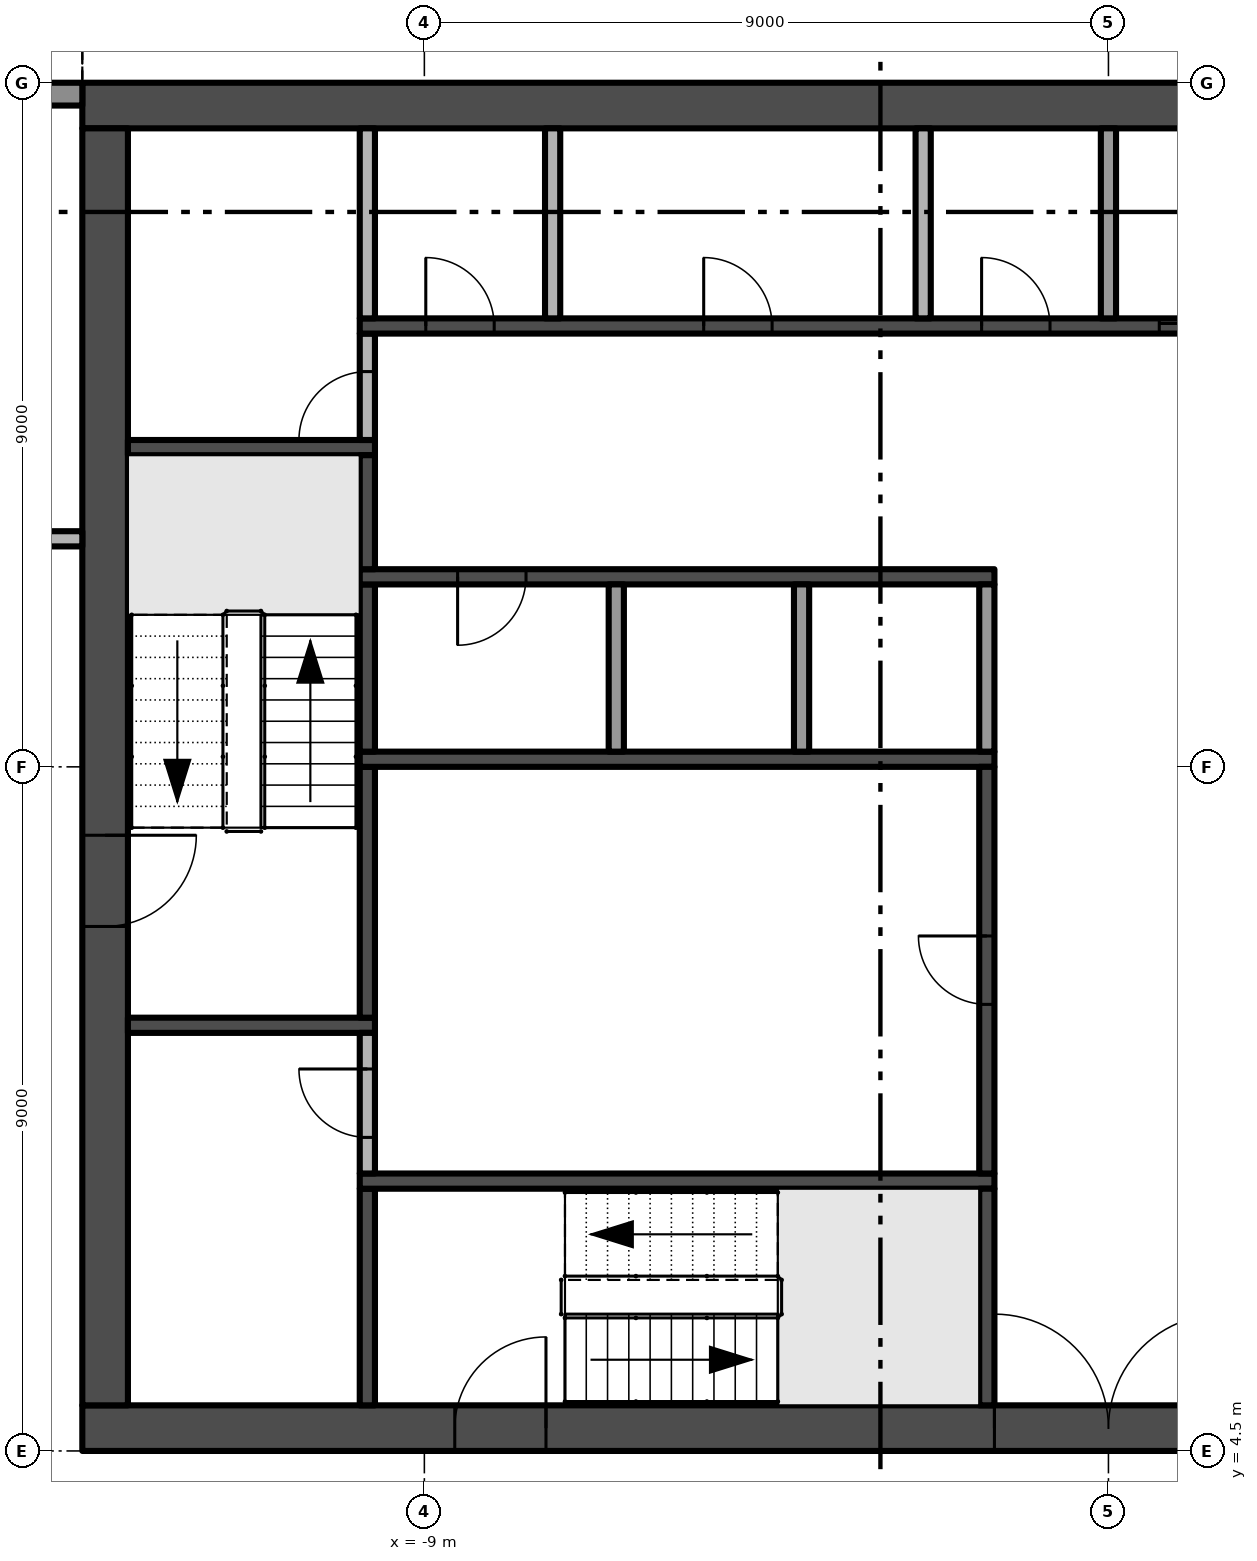
"""IFC4 building model, lengths in metres.
Left out: names, types, materials, properties, quantities, classifications, styles, units other than length and angle.
Written with IfcOpenShell. Run it as: python <this file> out.ifc"""

import sys

from ifc_helpers import new_model, si_unit, direction, frame, frame_2d, origin, place, context, subcontext, project, spatial, rectangle, extrude, element, fill, save


model = new_model("IFC4")
c1 = context("Model", 3, precision=1e-05, world=origin(), true_north=direction((0.0, 1.0)))
c2 = subcontext(c1, "Body", "Model", "MODEL_VIEW")
j1 = project(units=[si_unit("LENGTHUNIT", "METRE"), si_unit("PLANEANGLEUNIT", "RADIAN")], contexts=[c1])
p1 = place(None, origin())
s1 = spatial("IfcSite", under=j1, at=p1, CompositionType="ELEMENT")
p2 = place(p1, origin())
s2 = spatial("IfcBuilding", under=s1, at=p2, CompositionType="ELEMENT")
p3 = place(p2, frame((0.0, 0.0, 273.0)))
s3 = spatial("IfcBuildingStorey", under=s2, at=p3, CompositionType="ELEMENT", Elevation=273.0)
p4 = place(p3, frame((-13.5, 4.8, -0.3), z_axis=(0.0, 0.0, 1.0), x_axis=(1.0, 0.0, 0.0)))
e1 = element("IfcWall", 1, at=p4, inside=s3, PredefinedType="SHEAR", context=c2, shape_type="SweptSolid", body=[
    extrude(rectangle(XDim=27.0, YDim=0.6, at=frame_2d((13.5, 0.0))), origin(), (0.0, 0.0, 1.0), 3.8),
])
p5 = place(p4, frame((12.0, 0.0, 0.3)))
e2 = element("IfcOpeningElement", 2, at=p5, cuts=e1, PredefinedType="OPENING", context=c2, shape_type="SweptSolid", body=[
    extrude(rectangle(XDim=3.0, YDim=2.4, at=frame_2d((1.5, 1.2))), frame((0.0, 0.31, 0.0), z_axis=(0.0, -1.0, 0.0), x_axis=(1.0, 0.0, 0.0)), (0.0, 0.0, 1.0), 0.62),
])
p6 = place(p4, frame((4.9, 0.0, 0.3)))
e3 = element("IfcOpeningElement", 3, at=p6, cuts=e1, PredefinedType="OPENING", context=c2, shape_type="SweptSolid", body=[
    extrude(rectangle(XDim=1.2, YDim=2.2, at=frame_2d((0.6, 1.1))), frame((0.0, 0.31, 0.0), z_axis=(0.0, -1.0, 0.0), x_axis=(1.0, 0.0, 0.0)), (0.0, 0.0, 1.0), 0.62),
])
p7 = place(p4, frame((20.75, 0.0, 0.3)))
e4 = element("IfcOpeningElement", 4, at=p7, cuts=e1, PredefinedType="OPENING", context=c2, shape_type="SweptSolid", body=[
    extrude(rectangle(XDim=1.5, YDim=2.2, at=frame_2d((0.75, 1.1))), frame((0.0, 0.31, 0.0), z_axis=(0.0, -1.0, 0.0), x_axis=(1.0, 0.0, 0.0)), (0.0, 0.0, 1.0), 0.62),
])
p8 = place(p4, frame((17.4, 0.0, 0.3)))
e5 = element("IfcOpeningElement", 5, at=p8, cuts=e1, PredefinedType="OPENING", context=c2, shape_type="SweptSolid", body=[
    extrude(rectangle(XDim=1.2, YDim=2.2, at=frame_2d((0.6, 1.1))), frame((0.0, 0.31, 0.0), z_axis=(0.0, -1.0, 0.0), x_axis=(1.0, 0.0, 0.0)), (0.0, 0.0, 1.0), 0.62),
])
p9 = place(p3, frame((13.5, 22.2, -0.3), z_axis=(0.0, 0.0, 1.0), x_axis=(-1.0, 0.0, 0.0)))
e6 = element("IfcWall", 6, at=p9, inside=s3, PredefinedType="SHEAR", context=c2, shape_type="SweptSolid", body=[
    extrude(rectangle(XDim=27.0, YDim=0.6, at=frame_2d((13.5, 0.0))), origin(), (0.0, 0.0, 1.0), 3.8),
])
p10 = place(p3, frame((-13.2, 21.9, -0.3), z_axis=(0.0, 0.0, 1.0), x_axis=(0.0, -1.0, 0.0)))
e7 = element("IfcWall", 7, at=p10, inside=s3, PredefinedType="SHEAR", context=c2, shape_type="SweptSolid", body=[
    extrude(rectangle(XDim=16.8, YDim=0.6, at=frame_2d((8.4, 0.0))), origin(), (0.0, 0.0, 1.0), 3.8),
])
p11 = place(p10, frame((9.3, 0.0, 0.3)))
e8 = element("IfcOpeningElement", 8, at=p11, cuts=e7, PredefinedType="OPENING", context=c2, shape_type="SweptSolid", body=[
    extrude(rectangle(XDim=1.2, YDim=2.2, at=frame_2d((0.6, 1.1))), frame((0.0, 0.31, 0.0), z_axis=(0.0, -1.0, 0.0), x_axis=(1.0, 0.0, 0.0)), (0.0, 0.0, 1.0), 0.62),
])
p12 = place(p3, frame((-17.55, 22.35, 0.0), z_axis=(0.0, 0.0, 1.0), x_axis=(1.0, 0.0, 0.0)))
e9 = element("IfcWall", 9, at=p12, inside=s3, PredefinedType="SOLIDWALL", context=c2, shape_type="SweptSolid", body=[
    extrude(rectangle(XDim=4.05, YDim=0.3, at=frame_2d((2.025, 0.0))), origin(), (0.0, 0.0, 1.0), 3.5),
])
p13 = place(p12, frame((0.3, 0.0, 0.0)))
e10 = element("IfcOpeningElement", 10, at=p13, cuts=e9, PredefinedType="OPENING", context=c2, shape_type="SweptSolid", body=[
    extrude(rectangle(XDim=3.2, YDim=2.4, at=frame_2d((1.6, 1.2))), frame((0.0, 0.16, 0.0), z_axis=(0.0, -1.0, 0.0), x_axis=(1.0, 0.0, 0.0)), (0.0, 0.0, 1.0), 0.32),
])
for number, where, z_axis, x_axis in (
    (11, (-12.9, 10.1, 0.0), (0.0, 0.0, 1.0), (1.0, 0.0, 0.0)),
    (12, (-12.9, 17.7, 0.0), (0.0, 0.0, 1.0), (1.0, 0.0, 0.0)),
):
    element("IfcWall", number, at=place(p3, frame(where, z_axis=z_axis, x_axis=x_axis)), inside=s3, PredefinedType="SHEAR", context=c2, shape_type="SweptSolid", body=[
        extrude(rectangle(XDim=3.25, YDim=0.2, at=frame_2d((1.625, 0.0))), origin(), (0.0, 0.0, 1.0), 3.5),
    ])
p14 = place(p3, frame((-9.75, 5.1, 0.0), z_axis=(0.0, 0.0, 1.0), x_axis=(0.0, 1.0, 0.0)))
e13 = element("IfcWall", 13, at=p14, inside=s3, PredefinedType="SHEAR", context=c2, shape_type="SweptSolid", body=[
    extrude(rectangle(XDim=2.85, YDim=0.2, at=frame_2d((1.425, 0.0))), origin(), (0.0, 0.0, 1.0), 3.5),
])
p15 = place(p3, frame((-9.85, 8.05, 0.0), z_axis=(0.0, 0.0, 1.0), x_axis=(1.0, 0.0, 0.0)))
e14 = element("IfcWall", 14, at=p15, inside=s3, PredefinedType="SHEAR", context=c2, shape_type="SweptSolid", body=[
    extrude(rectangle(XDim=8.35, YDim=0.2, at=frame_2d((4.175, 0.0))), origin(), (0.0, 0.0, 1.0), 3.5),
])
p16 = place(p3, frame((-9.75, 8.15, 0.0), z_axis=(0.0, 0.0, 1.0), x_axis=(0.0, 1.0, 0.0)))
e15 = element("IfcWall", 15, at=p16, inside=s3, PredefinedType="PARTITIONING", context=c2, shape_type="SweptSolid", body=[
    extrude(rectangle(XDim=1.85, YDim=0.2, at=frame_2d((0.925, 0.0))), origin(), (0.0, 0.0, 1.0), 3.5),
])
p17 = place(p16, frame((0.475, 0.0, 0.0)))
e16 = element("IfcOpeningElement", 16, at=p17, cuts=e15, PredefinedType="OPENING", context=c2, shape_type="SweptSolid", body=[
    extrude(rectangle(XDim=0.9, YDim=2.1, at=frame_2d((0.45, 1.05))), frame((0.0, 0.11, 0.0), z_axis=(0.0, -1.0, 0.0), x_axis=(1.0, 0.0, 0.0)), (0.0, 0.0, 1.0), 0.22),
])
p18 = place(p3, frame((-9.75, 10.2, 0.0), z_axis=(0.0, 0.0, 1.0), x_axis=(0.0, 1.0, 0.0)))
e17 = element("IfcWall", 17, at=p18, inside=s3, PredefinedType="SHEAR", context=c2, shape_type="SweptSolid", body=[
    extrude(rectangle(XDim=3.3, YDim=0.2, at=frame_2d((1.65, 0.0))), origin(), (0.0, 0.0, 1.0), 3.5),
])
p19 = place(p3, frame((-9.85, 13.6, 0.0), z_axis=(0.0, 0.0, 1.0), x_axis=(1.0, 0.0, 0.0)))
e18 = element("IfcWall", 18, at=p19, inside=s3, PredefinedType="SHEAR", context=c2, shape_type="SweptSolid", body=[
    extrude(rectangle(XDim=8.35, YDim=0.2, at=frame_2d((4.175, 0.0))), origin(), (0.0, 0.0, 1.0), 3.5),
])
p20 = place(p3, frame((-9.75, 13.7, 0.0), z_axis=(0.0, 0.0, 1.0), x_axis=(0.0, 1.0, 0.0)))
e19 = element("IfcWall", 19, at=p20, inside=s3, PredefinedType="SHEAR", context=c2, shape_type="SweptSolid", body=[
    extrude(rectangle(XDim=2.2, YDim=0.2, at=frame_2d((1.1, 0.0))), origin(), (0.0, 0.0, 1.0), 3.5),
])
p21 = place(p3, frame((-1.5, 16.0, 0.0), z_axis=(0.0, 0.0, 1.0), x_axis=(-1.0, 0.0, 0.0)))
e20 = element("IfcWall", 20, at=p21, inside=s3, PredefinedType="SHEAR", context=c2, shape_type="SweptSolid", body=[
    extrude(rectangle(XDim=8.35, YDim=0.2, at=frame_2d((4.175, 0.0))), origin(), (0.0, 0.0, 1.0), 3.5),
])
p22 = place(p21, frame((6.162, 0.0, 0.0)))
e21 = element("IfcOpeningElement", 21, at=p22, cuts=e20, PredefinedType="OPENING", context=c2, shape_type="SweptSolid", body=[
    extrude(rectangle(XDim=0.9, YDim=2.1, at=frame_2d((0.45, 1.05))), frame((0.0, 0.11, 0.0), z_axis=(0.0, -1.0, 0.0), x_axis=(1.0, 0.0, 0.0)), (0.0, 0.0, 1.0), 0.22),
])
p23 = place(p3, frame((-9.75, 16.1, 0.0), z_axis=(0.0, 0.0, 1.0), x_axis=(0.0, 1.0, 0.0)))
e22 = element("IfcWall", 22, at=p23, inside=s3, PredefinedType="SHEAR", context=c2, shape_type="SweptSolid", body=[
    extrude(rectangle(XDim=1.5, YDim=0.2, at=frame_2d((0.75, 0.0))), origin(), (0.0, 0.0, 1.0), 3.5),
])
p24 = place(p3, frame((-9.75, 17.8, 0.0), z_axis=(0.0, 0.0, 1.0), x_axis=(0.0, 1.0, 0.0)))
e23 = element("IfcWall", 23, at=p24, inside=s3, PredefinedType="PARTITIONING", context=c2, shape_type="SweptSolid", body=[
    extrude(rectangle(XDim=1.4, YDim=0.2, at=frame_2d((0.7, 0.0))), origin(), (0.0, 0.0, 1.0), 3.5),
])
p25 = place(p24, origin())
e24 = element("IfcOpeningElement", 24, at=p25, cuts=e23, PredefinedType="OPENING", context=c2, shape_type="SweptSolid", body=[
    extrude(rectangle(XDim=0.9, YDim=2.1, at=frame_2d((0.45, 1.05))), frame((0.0, 0.11, 0.0), z_axis=(0.0, -1.0, 0.0), x_axis=(1.0, 0.0, 0.0)), (0.0, 0.0, 1.0), 0.22),
])
p26 = place(p3, frame((-9.85, 19.3, 0.0), z_axis=(0.0, 0.0, 1.0), x_axis=(1.0, 0.0, 0.0)))
e25 = element("IfcWall", 25, at=p26, inside=s3, PredefinedType="SHEAR", context=c2, shape_type="SweptSolid", body=[
    extrude(rectangle(XDim=19.7, YDim=0.2, at=frame_2d((9.85, 0.0))), origin(), (0.0, 0.0, 1.0), 3.5),
])
p27 = place(p26, frame((10.519, 0.0, 0.0)))
e26 = element("IfcOpeningElement", 26, at=p27, cuts=e25, PredefinedType="OPENING", context=c2, shape_type="SweptSolid", body=[
    extrude(rectangle(XDim=1.1, YDim=2.1, at=frame_2d((0.55, 1.05))), frame((0.0, 0.11, 0.0), z_axis=(0.0, -1.0, 0.0), x_axis=(1.0, 0.0, 0.0)), (0.0, 0.0, 1.0), 0.22),
])
p28 = place(p26, frame((12.956, 0.0, 0.0)))
e27 = element("IfcOpeningElement", 27, at=p28, cuts=e25, PredefinedType="OPENING", context=c2, shape_type="SweptSolid", body=[
    extrude(rectangle(XDim=1.1, YDim=2.1, at=frame_2d((0.55, 1.05))), frame((0.0, 0.11, 0.0), z_axis=(0.0, -1.0, 0.0), x_axis=(1.0, 0.0, 0.0)), (0.0, 0.0, 1.0), 0.22),
])
p29 = place(p26, frame((15.394, 0.0, 0.0)))
e28 = element("IfcOpeningElement", 28, at=p29, cuts=e25, PredefinedType="OPENING", context=c2, shape_type="SweptSolid", body=[
    extrude(rectangle(XDim=1.1, YDim=2.1, at=frame_2d((0.55, 1.05))), frame((0.0, 0.11, 0.0), z_axis=(0.0, -1.0, 0.0), x_axis=(1.0, 0.0, 0.0)), (0.0, 0.0, 1.0), 0.22),
])
p30 = place(p26, frame((17.831, 0.0, 0.0)))
e29 = element("IfcOpeningElement", 29, at=p30, cuts=e25, PredefinedType="OPENING", context=c2, shape_type="SweptSolid", body=[
    extrude(rectangle(XDim=1.1, YDim=2.1, at=frame_2d((0.55, 1.05))), frame((0.0, 0.11, 0.0), z_axis=(0.0, -1.0, 0.0), x_axis=(1.0, 0.0, 0.0)), (0.0, 0.0, 1.0), 0.22),
])
p31 = place(p26, frame((0.869, 0.0, 0.0)))
e30 = element("IfcOpeningElement", 30, at=p31, cuts=e25, PredefinedType="OPENING", context=c2, shape_type="SweptSolid", body=[
    extrude(rectangle(XDim=0.9, YDim=2.1, at=frame_2d((0.45, 1.05))), frame((0.0, 0.11, 0.0), z_axis=(0.0, -1.0, 0.0), x_axis=(1.0, 0.0, 0.0)), (0.0, 0.0, 1.0), 0.22),
])
p32 = place(p26, frame((4.525, 0.0, 0.0)))
e31 = element("IfcOpeningElement", 31, at=p32, cuts=e25, PredefinedType="OPENING", context=c2, shape_type="SweptSolid", body=[
    extrude(rectangle(XDim=0.9, YDim=2.1, at=frame_2d((0.45, 1.05))), frame((0.0, 0.11, 0.0), z_axis=(0.0, -1.0, 0.0), x_axis=(1.0, 0.0, 0.0)), (0.0, 0.0, 1.0), 0.22),
])
p33 = place(p26, frame((8.181, 0.0, 0.0)))
e32 = element("IfcOpeningElement", 32, at=p33, cuts=e25, PredefinedType="OPENING", context=c2, shape_type="SweptSolid", body=[
    extrude(rectangle(XDim=0.9, YDim=2.1, at=frame_2d((0.45, 1.05))), frame((0.0, 0.11, 0.0), z_axis=(0.0, -1.0, 0.0), x_axis=(1.0, 0.0, 0.0)), (0.0, 0.0, 1.0), 0.22),
])
for number, where, z_axis, x_axis in (
    (33, (-9.75, 19.4, 0.0), (0.0, 0.0, 1.0), (0.0, 1.0, 0.0)),
    (34, (-7.312, 19.4, 0.0), (0.0, 0.0, 1.0), (0.0, 1.0, 0.0)),
):
    element("IfcWall", number, at=place(p3, frame(where, z_axis=z_axis, x_axis=x_axis)), inside=s3, PredefinedType="PARTITIONING", context=c2, shape_type="SweptSolid", body=[
        extrude(rectangle(XDim=2.5, YDim=0.2, at=frame_2d((1.25, 0.0))), origin(), (0.0, 0.0, 1.0), 3.5),
    ])
for number, where, z_axis, x_axis in (
    (35, (-6.475, 13.7, 0.0), (0.0, 0.0, 1.0), (0.0, 1.0, 0.0)),
    (36, (-4.037, 13.7, 0.0), (0.0, 0.0, 1.0), (0.0, 1.0, 0.0)),
):
    element("IfcWall", number, at=place(p3, frame(where, z_axis=z_axis, x_axis=x_axis)), inside=s3, PredefinedType="PARTITIONING", context=c2, shape_type="SweptSolid", body=[
        extrude(rectangle(XDim=2.2, YDim=0.2, at=frame_2d((1.1, 0.0))), origin(), (0.0, 0.0, 1.0), 3.5),
    ])
p34 = place(p3, frame((-2.438, 19.4, 0.0), z_axis=(0.0, 0.0, 1.0), x_axis=(0.0, 1.0, 0.0)))
e37 = element("IfcWall", 37, at=p34, inside=s3, PredefinedType="PARTITIONING", context=c2, shape_type="SweptSolid", body=[
    extrude(rectangle(XDim=2.5, YDim=0.2, at=frame_2d((1.25, 0.0))), origin(), (0.0, 0.0, 1.0), 3.5),
])
p35 = place(p3, frame((-1.6, 5.1, 0.0), z_axis=(0.0, 0.0, 1.0), x_axis=(0.0, 1.0, 0.0)))
e38 = element("IfcWall", 38, at=p35, inside=s3, PredefinedType="SHEAR", context=c2, shape_type="SweptSolid", body=[
    extrude(rectangle(XDim=2.85, YDim=0.2, at=frame_2d((1.425, 0.0))), origin(), (0.0, 0.0, 1.0), 3.5),
])
p36 = place(p3, frame((-1.6, 8.15, 0.0), z_axis=(0.0, 0.0, 1.0), x_axis=(0.0, 1.0, 0.0)))
e39 = element("IfcWall", 39, at=p36, inside=s3, PredefinedType="SHEAR", context=c2, shape_type="SweptSolid", body=[
    extrude(rectangle(XDim=5.35, YDim=0.2, at=frame_2d((2.675, 0.0))), origin(), (0.0, 0.0, 1.0), 3.5),
])
p37 = place(p36, frame((2.225, 0.0, 0.0)))
e40 = element("IfcOpeningElement", 40, at=p37, cuts=e39, PredefinedType="OPENING", context=c2, shape_type="SweptSolid", body=[
    extrude(rectangle(XDim=0.9, YDim=2.1, at=frame_2d((0.45, 1.05))), frame((0.0, 0.11, 0.0), z_axis=(0.0, -1.0, 0.0), x_axis=(1.0, 0.0, 0.0)), (0.0, 0.0, 1.0), 0.22),
])
p38 = place(p3, frame((-1.6, 13.7, 0.0), z_axis=(0.0, 0.0, 1.0), x_axis=(0.0, 1.0, 0.0)))
e41 = element("IfcWall", 41, at=p38, inside=s3, PredefinedType="PARTITIONING", context=c2, shape_type="SweptSolid", body=[
    extrude(rectangle(XDim=2.2, YDim=0.2, at=frame_2d((1.1, 0.0))), origin(), (0.0, 0.0, 1.0), 3.5),
])
p39 = place(p3, frame((0.0, 19.4, 0.0), z_axis=(0.0, 0.0, 1.0), x_axis=(0.0, 1.0, 0.0)))
e42 = element("IfcWall", 42, at=p39, inside=s3, PredefinedType="PARTITIONING", context=c2, shape_type="SweptSolid", body=[
    extrude(rectangle(XDim=2.5, YDim=0.2, at=frame_2d((1.25, 0.0))), origin(), (0.0, 0.0, 1.0), 3.5),
])
p40 = place(p3, frame((-17.325, 16.5, 0.0), z_axis=(0.0, 0.0, 1.0), x_axis=(1.0, 0.0, 0.0)))
e43 = element("IfcWall", 43, at=p40, inside=s3, PredefinedType="PARTITIONING", context=c2, shape_type="SweptSolid", body=[
    extrude(rectangle(XDim=3.825, YDim=0.2, at=frame_2d((1.913, 0.0))), origin(), (0.0, 0.0, 1.0), 3.5),
])
p41 = place(p40, frame((1.35, 0.0, 0.0)))
e44 = element("IfcOpeningElement", 44, at=p41, cuts=e43, PredefinedType="OPENING", context=c2, shape_type="SweptSolid", body=[
    extrude(rectangle(XDim=0.9, YDim=2.1, at=frame_2d((0.45, 1.05))), frame((0.0, 0.11, 0.0), z_axis=(0.0, -1.0, 0.0), x_axis=(1.0, 0.0, 0.0)), (0.0, 0.0, 1.0), 0.22),
])
p42 = place(p5, frame((3.0, 0.0, 0.0), z_axis=(0.0, 0.0, 1.0), x_axis=(-1.0, 0.0, 0.0)))
e45 = element("IfcDoor", 45, at=p42, inside=s3, OperationType="DOUBLE_DOOR_SINGLE_SWING", PredefinedType="DOOR", context=c2, shape_type="SweptSolid", body=[
    extrude(rectangle(XDim=3.0, YDim=2.4, at=frame_2d((1.5, 1.2))), frame((0.0, 0.025, 0.0), z_axis=(0.0, -1.0, 0.0), x_axis=(1.0, 0.0, 0.0)), (0.0, 0.0, 1.0), 0.05),
])
fill(e2, e45)
p43 = place(p11, frame((1.2, 0.0, 0.0), z_axis=(0.0, 0.0, 1.0), x_axis=(-1.0, 0.0, 0.0)))
e46 = element("IfcDoor", 46, at=p43, inside=s3, OperationType="SINGLE_SWING_RIGHT", PredefinedType="DOOR", context=c2, shape_type="SweptSolid", body=[
    extrude(rectangle(XDim=1.2, YDim=2.2, at=frame_2d((0.6, 1.1))), frame((0.0, 0.025, 0.0), z_axis=(0.0, -1.0, 0.0), x_axis=(1.0, 0.0, 0.0)), (0.0, 0.0, 1.0), 0.05),
])
fill(e8, e46)
p44 = place(p6, frame((1.2, 0.0, 0.0), z_axis=(0.0, 0.0, 1.0), x_axis=(-1.0, 0.0, 0.0)))
e47 = element("IfcDoor", 47, at=p44, inside=s3, OperationType="SINGLE_SWING_LEFT", PredefinedType="DOOR", context=c2, shape_type="SweptSolid", body=[
    extrude(rectangle(XDim=1.2, YDim=2.2, at=frame_2d((0.6, 1.1))), frame((0.0, 0.025, 0.0), z_axis=(0.0, -1.0, 0.0), x_axis=(1.0, 0.0, 0.0)), (0.0, 0.0, 1.0), 0.05),
])
fill(e3, e47)
p45 = place(p27, origin())
e48 = element("IfcDoor", 48, at=p45, inside=s3, OperationType="SLIDING_TO_RIGHT", PredefinedType="DOOR", context=c2, shape_type="SweptSolid", body=[
    extrude(rectangle(XDim=1.1, YDim=2.1, at=frame_2d((0.55, 1.05))), frame((0.0, 0.025, 0.0), z_axis=(0.0, -1.0, 0.0), x_axis=(1.0, 0.0, 0.0)), (0.0, 0.0, 1.0), 0.05),
])
fill(e26, e48)
p46 = place(p37, origin())
e49 = element("IfcDoor", 49, at=p46, inside=s3, OperationType="SINGLE_SWING_RIGHT", PredefinedType="DOOR", context=c2, shape_type="SweptSolid", body=[
    extrude(rectangle(XDim=0.9, YDim=2.1, at=frame_2d((0.45, 1.05))), frame((0.0, 0.025, 0.0), z_axis=(0.0, -1.0, 0.0), x_axis=(1.0, 0.0, 0.0)), (0.0, 0.0, 1.0), 0.05),
])
fill(e40, e49)
p47 = place(p22, origin())
e50 = element("IfcDoor", 50, at=p47, inside=s3, OperationType="SINGLE_SWING_RIGHT", PredefinedType="DOOR", context=c2, shape_type="SweptSolid", body=[
    extrude(rectangle(XDim=0.9, YDim=2.1, at=frame_2d((0.45, 1.05))), frame((0.0, 0.025, 0.0), z_axis=(0.0, -1.0, 0.0), x_axis=(1.0, 0.0, 0.0)), (0.0, 0.0, 1.0), 0.05),
])
fill(e21, e50)
p48 = place(p25, origin())
e51 = element("IfcDoor", 51, at=p48, inside=s3, OperationType="SINGLE_SWING_LEFT", PredefinedType="DOOR", context=c2, shape_type="SweptSolid", body=[
    extrude(rectangle(XDim=0.9, YDim=2.1, at=frame_2d((0.45, 1.05))), frame((0.0, 0.025, 0.0), z_axis=(0.0, -1.0, 0.0), x_axis=(1.0, 0.0, 0.0)), (0.0, 0.0, 1.0), 0.05),
])
fill(e24, e51)
p49 = place(p31, origin())
e52 = element("IfcDoor", 52, at=p49, inside=s3, OperationType="SINGLE_SWING_LEFT", PredefinedType="DOOR", context=c2, shape_type="SweptSolid", body=[
    extrude(rectangle(XDim=0.9, YDim=2.1, at=frame_2d((0.45, 1.05))), frame((0.0, 0.025, 0.0), z_axis=(0.0, -1.0, 0.0), x_axis=(1.0, 0.0, 0.0)), (0.0, 0.0, 1.0), 0.05),
])
fill(e30, e52)
p50 = place(p32, origin())
e53 = element("IfcDoor", 53, at=p50, inside=s3, OperationType="SINGLE_SWING_LEFT", PredefinedType="DOOR", context=c2, shape_type="SweptSolid", body=[
    extrude(rectangle(XDim=0.9, YDim=2.1, at=frame_2d((0.45, 1.05))), frame((0.0, 0.025, 0.0), z_axis=(0.0, -1.0, 0.0), x_axis=(1.0, 0.0, 0.0)), (0.0, 0.0, 1.0), 0.05),
])
fill(e31, e53)
p51 = place(p33, origin())
e54 = element("IfcDoor", 54, at=p51, inside=s3, OperationType="SINGLE_SWING_LEFT", PredefinedType="DOOR", context=c2, shape_type="SweptSolid", body=[
    extrude(rectangle(XDim=0.9, YDim=2.1, at=frame_2d((0.45, 1.05))), frame((0.0, 0.025, 0.0), z_axis=(0.0, -1.0, 0.0), x_axis=(1.0, 0.0, 0.0)), (0.0, 0.0, 1.0), 0.05),
])
fill(e32, e54)
p52 = place(p17, origin())
e55 = element("IfcDoor", 55, at=p52, inside=s3, OperationType="SINGLE_SWING_RIGHT", PredefinedType="DOOR", context=c2, shape_type="SweptSolid", body=[
    extrude(rectangle(XDim=0.9, YDim=2.1, at=frame_2d((0.45, 1.05))), frame((0.0, 0.025, 0.0), z_axis=(0.0, -1.0, 0.0), x_axis=(1.0, 0.0, 0.0)), (0.0, 0.0, 1.0), 0.05),
])
fill(e16, e55)
save(model, sys.argv[1])
